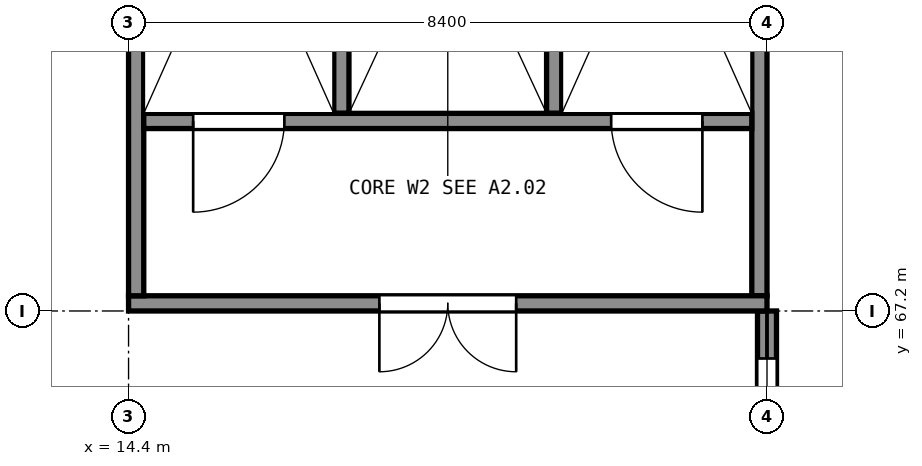
"""IFC4 building model, lengths in metres.
Left out: names, types, materials, properties, quantities, classifications, styles, units other than length and angle.
Written with IfcOpenShell. Run it as: python <this file> out.ifc"""

import sys

from ifc_helpers import new_model, si_unit, direction, frame, frame_2d, origin, place, context, subcontext, project, spatial, rectangle, extrude, element, fill, save


model = new_model("IFC4")
c1 = context("Model", 3, precision=1e-05, world=origin(), true_north=direction((0.0, 1.0)))
c2 = subcontext(c1, "Body", "Model", "MODEL_VIEW")
j1 = project(units=[si_unit("LENGTHUNIT", "METRE"), si_unit("PLANEANGLEUNIT", "RADIAN")], contexts=[c1])
p1 = place(None, origin())
s1 = spatial("IfcSite", under=j1, at=p1, CompositionType="ELEMENT")
p2 = place(p1, origin())
s2 = spatial("IfcBuilding", under=s1, at=p2, CompositionType="ELEMENT")
p3 = place(p2, frame((0.0, 0.0, 10.5)))
s3 = spatial("IfcBuildingStorey", under=s2, at=p3, CompositionType="ELEMENT", Elevation=10.5)
p4 = place(p3, frame((14.4, 67.3, 0.0), z_axis=(0.0, 0.0, 1.0), x_axis=(1.0, 0.0, 0.0)))
e1 = element("IfcWall", 1, at=p4, inside=s3, PredefinedType="SHEAR", context=c2, shape_type="SweptSolid", body=[
    extrude(rectangle(XDim=8.4, YDim=0.2, at=frame_2d((4.2, 0.0))), origin(), (0.0, 0.0, 1.0), 9.5),
])
p5 = place(p4, frame((3.3, 0.0, 0.0)))
e2 = element("IfcOpeningElement", 2, at=p5, cuts=e1, PredefinedType="OPENING", context=c2, shape_type="SweptSolid", body=[
    extrude(rectangle(XDim=1.8, YDim=2.1, at=frame_2d((0.9, 1.05))), frame((0.0, 0.11, 0.0), z_axis=(0.0, -1.0, 0.0), x_axis=(1.0, 0.0, 0.0)), (0.0, 0.0, 1.0), 0.22),
])
for number, where, z_axis, x_axis in (
    (3, (14.5, 67.4, 0.0), (0.0, 0.0, 1.0), (0.0, 1.0, 0.0)),
    (4, (22.7, 67.4, 0.0), (0.0, 0.0, 1.0), (0.0, 1.0, 0.0)),
):
    element("IfcWall", number, at=place(p3, frame(where, z_axis=z_axis, x_axis=x_axis)), inside=s3, PredefinedType="SHEAR", context=c2, shape_type="SweptSolid", body=[
        extrude(rectangle(XDim=8.0, YDim=0.2, at=frame_2d((4.0, 0.0))), origin(), (0.0, 0.0, 1.0), 9.5),
    ])
p6 = place(p3, frame((14.6, 69.7, 0.0), z_axis=(0.0, 0.0, 1.0), x_axis=(1.0, 0.0, 0.0)))
e5 = element("IfcWall", 5, at=p6, inside=s3, PredefinedType="SHEAR", context=c2, shape_type="SweptSolid", body=[
    extrude(rectangle(XDim=8.0, YDim=0.2, at=frame_2d((4.0, 0.0))), origin(), (0.0, 0.0, 1.0), 9.5),
])
p7 = place(p6, frame((0.65, 0.0, 0.0)))
e6 = element("IfcOpeningElement", 6, at=p7, cuts=e5, PredefinedType="OPENING", context=c2, shape_type="SweptSolid", body=[
    extrude(rectangle(XDim=1.2, YDim=2.1, at=frame_2d((0.6, 1.05))), frame((0.0, 0.11, 0.0), z_axis=(0.0, -1.0, 0.0), x_axis=(1.0, 0.0, 0.0)), (0.0, 0.0, 1.0), 0.22),
])
p8 = place(p6, frame((6.15, 0.0, 0.0)))
e7 = element("IfcOpeningElement", 7, at=p8, cuts=e5, PredefinedType="OPENING", context=c2, shape_type="SweptSolid", body=[
    extrude(rectangle(XDim=1.2, YDim=2.1, at=frame_2d((0.6, 1.05))), frame((0.0, 0.11, 0.0), z_axis=(0.0, -1.0, 0.0), x_axis=(1.0, 0.0, 0.0)), (0.0, 0.0, 1.0), 0.22),
])
for number, where, z_axis, x_axis in (
    (8, (17.2, 69.8, 0.0), (0.0, 0.0, 1.0), (0.0, 1.0, 0.0)),
    (9, (20.0, 69.8, 0.0), (0.0, 0.0, 1.0), (0.0, 1.0, 0.0)),
):
    element("IfcWall", number, at=place(p3, frame(where, z_axis=z_axis, x_axis=x_axis)), inside=s3, PredefinedType="SHEAR", context=c2, shape_type="SweptSolid", body=[
        extrude(rectangle(XDim=5.6, YDim=0.2, at=frame_2d((2.8, 0.0))), origin(), (0.0, 0.0, 1.0), 9.5),
    ])
p9 = place(p3, frame((22.8, 59.15, 0.0), z_axis=(0.0, 0.0, 1.0), x_axis=(0.0, 1.0, 0.0)))
e10 = element("IfcWall", 10, at=p9, inside=s3, PredefinedType="SOLIDWALL", context=c2, shape_type="SweptSolid", body=[
    extrude(rectangle(XDim=8.05, YDim=0.25, at=frame_2d((4.025, 0.0))), origin(), (0.0, 0.0, 1.0), 8.44),
])
p10 = place(p9, frame((0.625, 0.0, 0.9)))
e11 = element("IfcOpeningElement", 11, at=p10, cuts=e10, PredefinedType="OPENING", context=c2, shape_type="SweptSolid", body=[
    extrude(rectangle(XDim=1.2, YDim=6.0, at=frame_2d((0.6, 3.0))), frame((0.0, 0.135, 0.0), z_axis=(0.0, -1.0, 0.0), x_axis=(1.0, 0.0, 0.0)), (0.0, 0.0, 1.0), 0.27),
])
p11 = place(p9, frame((3.425, 0.0, 0.9)))
e12 = element("IfcOpeningElement", 12, at=p11, cuts=e10, PredefinedType="OPENING", context=c2, shape_type="SweptSolid", body=[
    extrude(rectangle(XDim=1.2, YDim=6.0, at=frame_2d((0.6, 3.0))), frame((0.0, 0.135, 0.0), z_axis=(0.0, -1.0, 0.0), x_axis=(1.0, 0.0, 0.0)), (0.0, 0.0, 1.0), 0.27),
])
p12 = place(p9, frame((6.225, 0.0, 0.9)))
e13 = element("IfcOpeningElement", 13, at=p12, cuts=e10, PredefinedType="OPENING", context=c2, shape_type="SweptSolid", body=[
    extrude(rectangle(XDim=1.2, YDim=6.0, at=frame_2d((0.6, 3.0))), frame((0.0, 0.135, 0.0), z_axis=(0.0, -1.0, 0.0), x_axis=(1.0, 0.0, 0.0)), (0.0, 0.0, 1.0), 0.27),
])
p13 = place(p12, origin())
e14 = element("IfcWindow", 14, at=p13, inside=s3, PartitioningType="SINGLE_PANEL", PredefinedType="WINDOW", context=c2, shape_type="SweptSolid", body=[
    extrude(rectangle(XDim=1.2, YDim=6.0, at=frame_2d((0.6, 3.0))), frame((0.0, 0.105, 0.0), z_axis=(0.0, -1.0, 0.0), x_axis=(1.0, 0.0, 0.0)), (0.0, 0.0, 1.0), 0.06),
])
fill(e13, e14)
p14 = place(p5, origin())
e15 = element("IfcDoor", 15, at=p14, inside=s3, OperationType="DOUBLE_DOOR_SINGLE_SWING", PredefinedType="DOOR", context=c2, shape_type="SweptSolid", body=[
    extrude(rectangle(XDim=1.8, YDim=2.1, at=frame_2d((0.9, 1.05))), frame((0.0, 0.025, 0.0), z_axis=(0.0, -1.0, 0.0), x_axis=(1.0, 0.0, 0.0)), (0.0, 0.0, 1.0), 0.05),
])
fill(e2, e15)
p15 = place(p7, origin())
e16 = element("IfcDoor", 16, at=p15, inside=s3, OperationType="SINGLE_SWING_LEFT", PredefinedType="DOOR", context=c2, shape_type="SweptSolid", body=[
    extrude(rectangle(XDim=1.2, YDim=2.1, at=frame_2d((0.6, 1.05))), frame((0.0, 0.025, 0.0), z_axis=(0.0, -1.0, 0.0), x_axis=(1.0, 0.0, 0.0)), (0.0, 0.0, 1.0), 0.05),
])
fill(e6, e16)
p16 = place(p8, origin())
e17 = element("IfcDoor", 17, at=p16, inside=s3, OperationType="SINGLE_SWING_RIGHT", PredefinedType="DOOR", context=c2, shape_type="SweptSolid", body=[
    extrude(rectangle(XDim=1.2, YDim=2.1, at=frame_2d((0.6, 1.05))), frame((0.0, 0.025, 0.0), z_axis=(0.0, -1.0, 0.0), x_axis=(1.0, 0.0, 0.0)), (0.0, 0.0, 1.0), 0.05),
])
fill(e7, e17)
save(model, sys.argv[1])
